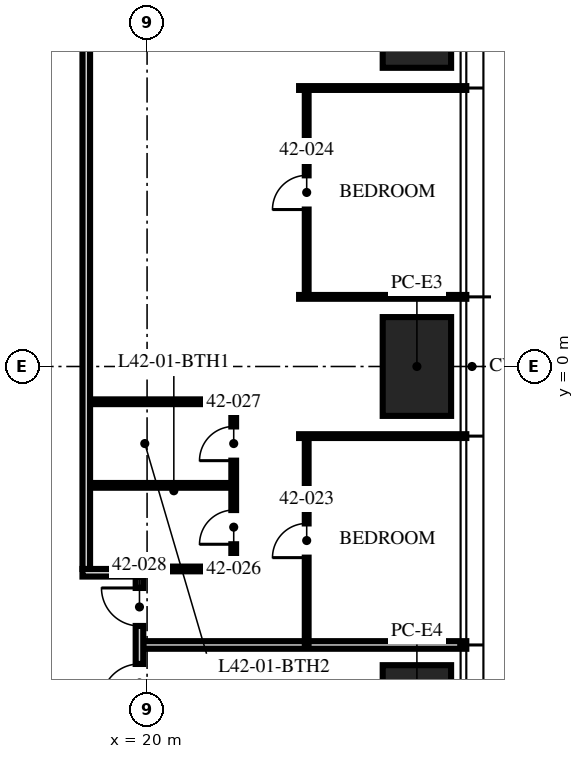
"""IFC4 building model, lengths in metres.
Left out: names, types, materials, properties, quantities, classifications, styles, units other than length and angle.
Written with IfcOpenShell. Run it as: python <this file> out.ifc"""

import sys

from ifc_helpers import new_model, si_unit, direction, frame, frame_2d, origin, origin_2d, place, context, subcontext, project, spatial, rectangle, extrude, element, fill, save


model = new_model("IFC4")
c1 = context("Model", 3, precision=1e-05, world=origin(), true_north=direction((0.0, 1.0)))
c2 = subcontext(c1, "Body", "Model", "MODEL_VIEW")
j1 = project(units=[si_unit("LENGTHUNIT", "METRE"), si_unit("PLANEANGLEUNIT", "RADIAN")], contexts=[c1])
p1 = place(None, origin())
s1 = spatial("IfcSite", under=j1, at=p1, CompositionType="ELEMENT")
p2 = place(p1, origin())
s2 = spatial("IfcBuilding", under=s1, at=p2, CompositionType="ELEMENT")
p3 = place(p2, frame((0.0, 0.0, 167.25)))
s3 = spatial("IfcBuildingStorey", under=s2, at=p3, CompositionType="ELEMENT", Elevation=167.25)
for number, where, z_axis, x_axis in (
    (1, (27.1, 9.16, 0.0), (0.0, 0.0, 1.0), (0.0, 1.0, 0.0)),
    (2, (27.1, 0.0, 0.0), (0.0, 0.0, 1.0), (0.0, 1.0, 0.0)),
    (3, (27.1, -9.16, 0.0), (0.0, 0.0, 1.0), (0.0, 1.0, 0.0)),
):
    element("IfcColumn", number, at=place(p3, frame(where, z_axis=z_axis, x_axis=x_axis)), inside=s3, PredefinedType="COLUMN", context=c2, shape_type="SweptSolid", body=[
        extrude(rectangle(XDim=2.6, YDim=1.8, at=origin_2d()), origin(), (0.0, 0.0, 1.0), 3.75),
    ])
p4 = place(p3, frame((19.9, -7.328, 0.0), z_axis=(0.0, 0.0, 1.0), x_axis=(1.0, 0.0, 0.0)))
e4 = element("IfcWall", 4, at=p4, inside=s3, PredefinedType="PARTITIONING", context=c2, shape_type="SweptSolid", body=[
    extrude(rectangle(XDim=8.5, YDim=0.2, at=frame_2d((4.25, 0.0))), origin(), (0.0, 0.0, 1.0), 2.81),
])
for number, where, z_axis, x_axis in (
    (5, (24.0, -1.832, 0.0), (0.0, 0.0, 1.0), (1.0, 0.0, 0.0)),
    (6, (24.0, 1.832, 0.0), (0.0, 0.0, 1.0), (1.0, 0.0, 0.0)),
    (7, (24.0, 7.328, 0.0), (0.0, 0.0, 1.0), (1.0, 0.0, 0.0)),
):
    element("IfcWall", number, at=place(p3, frame(where, z_axis=z_axis, x_axis=x_axis)), inside=s3, PredefinedType="PARTITIONING", context=c2, shape_type="SweptSolid", body=[
        extrude(rectangle(XDim=4.4, YDim=0.1, at=frame_2d((2.2, 0.0))), origin(), (0.0, 0.0, 1.0), 2.81),
    ])
p5 = place(p3, frame((24.2, -7.328, 0.0), z_axis=(0.0, 0.0, 1.0), x_axis=(0.0, 1.0, 0.0)))
e8 = element("IfcWall", 8, at=p5, inside=s3, PredefinedType="PARTITIONING", context=c2, shape_type="SweptSolid", body=[
    extrude(rectangle(XDim=5.496, YDim=0.1, at=frame_2d((2.748, 0.0))), origin(), (0.0, 0.0, 1.0), 2.81),
])
p6 = place(p5, frame((2.298, 0.0, 0.0)))
e9 = element("IfcOpeningElement", 9, at=p6, cuts=e8, PredefinedType="OPENING", context=c2, shape_type="SweptSolid", body=[
    extrude(rectangle(XDim=0.9, YDim=2.1, at=frame_2d((0.45, 1.05))), frame((0.0, 0.06, 0.0), z_axis=(0.0, -1.0, 0.0), x_axis=(1.0, 0.0, 0.0)), (0.0, 0.0, 1.0), 0.12),
])
p7 = place(p3, frame((24.2, 1.832, 0.0), z_axis=(0.0, 0.0, 1.0), x_axis=(0.0, 1.0, 0.0)))
e10 = element("IfcWall", 10, at=p7, inside=s3, PredefinedType="PARTITIONING", context=c2, shape_type="SweptSolid", body=[
    extrude(rectangle(XDim=5.496, YDim=0.1, at=frame_2d((2.748, 0.0))), origin(), (0.0, 0.0, 1.0), 2.81),
])
p8 = place(p7, frame((2.298, 0.0, 0.0)))
e11 = element("IfcOpeningElement", 11, at=p8, cuts=e10, PredefinedType="OPENING", context=c2, shape_type="SweptSolid", body=[
    extrude(rectangle(XDim=0.9, YDim=2.1, at=frame_2d((0.45, 1.05))), frame((0.0, 0.06, 0.0), z_axis=(0.0, -1.0, 0.0), x_axis=(1.0, 0.0, 0.0)), (0.0, 0.0, 1.0), 0.12),
])
p9 = place(p3, frame((22.28, -5.328, 0.0), z_axis=(0.0, 0.0, 1.0), x_axis=(0.0, 1.0, 0.0)))
e12 = element("IfcWall", 12, at=p9, inside=s3, PredefinedType="PARTITIONING", context=c2, shape_type="SweptSolid", body=[
    extrude(rectangle(XDim=4.4, YDim=0.125, at=frame_2d((2.2, 0.0))), origin(), (0.0, 0.0, 1.0), 2.81),
])
p10 = place(p9, frame((0.65, 0.0, 0.0)))
e13 = element("IfcOpeningElement", 13, at=p10, cuts=e12, PredefinedType="OPENING", context=c2, shape_type="SweptSolid", body=[
    extrude(rectangle(XDim=0.9, YDim=2.1, at=frame_2d((0.45, 1.05))), frame((0.0, 0.073, 0.0), z_axis=(0.0, -1.0, 0.0), x_axis=(1.0, 0.0, 0.0)), (0.0, 0.0, 1.0), 0.145),
])
p11 = place(p9, frame((2.85, 0.0, 0.0)))
e14 = element("IfcOpeningElement", 14, at=p11, cuts=e12, PredefinedType="OPENING", context=c2, shape_type="SweptSolid", body=[
    extrude(rectangle(XDim=0.9, YDim=2.1, at=frame_2d((0.45, 1.05))), frame((0.0, 0.073, 0.0), z_axis=(0.0, -1.0, 0.0), x_axis=(1.0, 0.0, 0.0)), (0.0, 0.0, 1.0), 0.145),
])
p12 = place(p3, frame((19.97, -5.328, 0.0), z_axis=(0.0, 0.0, 1.0), x_axis=(1.0, 0.0, 0.0)))
e15 = element("IfcWall", 15, at=p12, inside=s3, PredefinedType="PARTITIONING", context=c2, shape_type="SweptSolid", body=[
    extrude(rectangle(XDim=2.31, YDim=0.125, at=frame_2d((1.155, 0.0))), origin(), (0.0, 0.0, 1.0), 3.5),
])
for number, where, z_axis, x_axis in (
    (16, (18.5, -3.128, 0.0), (0.0, 0.0, 1.0), (1.0, 0.0, 0.0)),
    (17, (18.5, -0.928, 0.0), (0.0, 0.0, 1.0), (1.0, 0.0, 0.0)),
):
    element("IfcWall", number, at=place(p3, frame(where, z_axis=z_axis, x_axis=x_axis)), inside=s3, PredefinedType="PARTITIONING", context=c2, shape_type="SweptSolid", body=[
        extrude(rectangle(XDim=3.78, YDim=0.125, at=frame_2d((1.89, 0.0))), origin(), (0.0, 0.0, 1.0), 3.5),
    ])
p13 = place(p3, frame((18.3, -5.428, 0.0), z_axis=(0.0, 0.0, 1.0), x_axis=(1.0, 0.0, 0.0)))
e18 = element("IfcWall", 18, at=p13, inside=s3, PredefinedType="PARTITIONING", context=c2, shape_type="SweptSolid", body=[
    extrude(rectangle(XDim=1.6, YDim=0.2, at=frame_2d((0.8, 0.0))), origin(), (0.0, 0.0, 1.0), 3.5),
])
p14 = place(p3, frame((19.8, -9.128, 0.0), z_axis=(0.0, 0.0, 1.0), x_axis=(0.0, 1.0, 0.0)))
e19 = element("IfcWall", 19, at=p14, inside=s3, PredefinedType="PARTITIONING", context=c2, shape_type="SweptSolid", body=[
    extrude(rectangle(XDim=3.6, YDim=0.2, at=frame_2d((1.8, 0.0))), origin(), (0.0, 0.0, 1.0), 2.7),
])
p15 = place(p14, frame((2.3, 0.0, 0.0)))
e20 = element("IfcOpeningElement", 20, at=p15, cuts=e19, PredefinedType="OPENING", context=c2, shape_type="SweptSolid", body=[
    extrude(rectangle(XDim=1.0, YDim=2.2, at=frame_2d((0.5, 1.1))), frame((0.0, 0.11, 0.0), z_axis=(0.0, -1.0, 0.0), x_axis=(1.0, 0.0, 0.0)), (0.0, 0.0, 1.0), 0.22),
])
p16 = place(p14, frame((0.3, 0.0, 0.0)))
e21 = element("IfcOpeningElement", 21, at=p16, cuts=e19, PredefinedType="OPENING", context=c2, shape_type="SweptSolid", body=[
    extrude(rectangle(XDim=1.0, YDim=2.2, at=frame_2d((0.5, 1.1))), frame((0.0, 0.11, 0.0), z_axis=(0.0, -1.0, 0.0), x_axis=(1.0, 0.0, 0.0)), (0.0, 0.0, 1.0), 0.22),
])
p17 = place(p3, frame((18.4, -5.328, 0.0), z_axis=(0.0, 0.0, 1.0), x_axis=(0.0, 1.0, 0.0)))
e22 = element("IfcWall", 22, at=p17, inside=s3, PredefinedType="PARTITIONING", context=c2, shape_type="SweptSolid", body=[
    extrude(rectangle(XDim=22.028, YDim=0.2, at=frame_2d((11.014, 0.0))), origin(), (0.0, 0.0, 1.0), 2.7),
])
p18 = place(p6, origin())
e23 = element("IfcDoor", 23, at=p18, inside=s3, OperationType="SINGLE_SWING_LEFT", PredefinedType="DOOR", context=c2, shape_type="SweptSolid", body=[
    extrude(rectangle(XDim=0.9, YDim=2.1, at=frame_2d((0.45, 1.05))), frame((0.0, 0.025, 0.0), z_axis=(0.0, -1.0, 0.0), x_axis=(1.0, 0.0, 0.0)), (0.0, 0.0, 1.0), 0.05),
])
fill(e9, e23)
p19 = place(p8, origin())
e24 = element("IfcDoor", 24, at=p19, inside=s3, OperationType="SINGLE_SWING_LEFT", PredefinedType="DOOR", context=c2, shape_type="SweptSolid", body=[
    extrude(rectangle(XDim=0.9, YDim=2.1, at=frame_2d((0.45, 1.05))), frame((0.0, 0.025, 0.0), z_axis=(0.0, -1.0, 0.0), x_axis=(1.0, 0.0, 0.0)), (0.0, 0.0, 1.0), 0.05),
])
fill(e11, e24)
p20 = place(p10, origin())
e25 = element("IfcDoor", 25, at=p20, inside=s3, OperationType="SINGLE_SWING_LEFT", PredefinedType="DOOR", context=c2, shape_type="SweptSolid", body=[
    extrude(rectangle(XDim=0.9, YDim=2.1, at=frame_2d((0.45, 1.05))), frame((0.0, 0.025, 0.0), z_axis=(0.0, -1.0, 0.0), x_axis=(1.0, 0.0, 0.0)), (0.0, 0.0, 1.0), 0.05),
])
fill(e13, e25)
p21 = place(p11, origin())
e26 = element("IfcDoor", 26, at=p21, inside=s3, OperationType="SINGLE_SWING_LEFT", PredefinedType="DOOR", context=c2, shape_type="SweptSolid", body=[
    extrude(rectangle(XDim=0.9, YDim=2.1, at=frame_2d((0.45, 1.05))), frame((0.0, 0.025, 0.0), z_axis=(0.0, -1.0, 0.0), x_axis=(1.0, 0.0, 0.0)), (0.0, 0.0, 1.0), 0.05),
])
fill(e14, e26)
p22 = place(p15, origin())
e27 = element("IfcDoor", 27, at=p22, inside=s3, OperationType="SINGLE_SWING_RIGHT", PredefinedType="DOOR", context=c2, shape_type="SweptSolid", body=[
    extrude(rectangle(XDim=1.0, YDim=2.2, at=frame_2d((0.5, 1.1))), frame((0.0, 0.025, 0.0), z_axis=(0.0, -1.0, 0.0), x_axis=(1.0, 0.0, 0.0)), (0.0, 0.0, 1.0), 0.05),
])
fill(e20, e27)
p23 = place(p16, origin())
e28 = element("IfcDoor", 28, at=p23, inside=s3, OperationType="SINGLE_SWING_LEFT", PredefinedType="DOOR", context=c2, shape_type="SweptSolid", body=[
    extrude(rectangle(XDim=1.0, YDim=2.2, at=frame_2d((0.5, 1.1))), frame((0.0, 0.025, 0.0), z_axis=(0.0, -1.0, 0.0), x_axis=(1.0, 0.0, 0.0)), (0.0, 0.0, 1.0), 0.05),
])
fill(e21, e28)
save(model, sys.argv[1])
